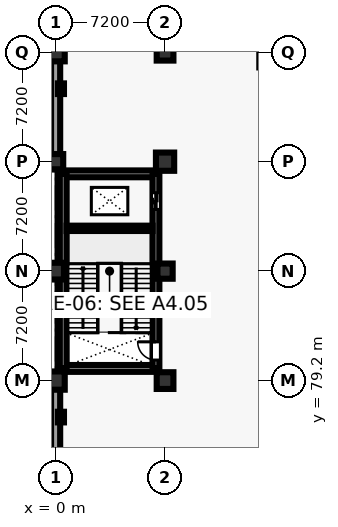
"""IFC4 building model, lengths in metres.
Left out: names, types, materials, properties, quantities, classifications, styles, units other than length and angle.
Written with IfcOpenShell. Run it as: python <this file> out.ifc"""

import sys

from ifc_helpers import new_model, si_unit, direction, frame, frame_2d, origin, origin_2d, place, context, subcontext, project, spatial, rectangle, circle, extrude, element, fill, save


model = new_model("IFC4")
c1 = context("Model", 3, precision=1e-05, world=origin(), true_north=direction((0.0, 1.0)))
c2 = subcontext(c1, "Body", "Model", "MODEL_VIEW")
j1 = project(units=[si_unit("LENGTHUNIT", "METRE"), si_unit("PLANEANGLEUNIT", "RADIAN")], contexts=[c1])
p1 = place(None, origin())
s1 = spatial("IfcSite", under=j1, at=p1, CompositionType="ELEMENT")
p2 = place(p1, origin())
s2 = spatial("IfcBuilding", under=s1, at=p2, CompositionType="ELEMENT")
p3 = place(p2, frame((0.0, 0.0, -5.4)))
s3 = spatial("IfcBuildingStorey", under=s2, at=p3, CompositionType="ELEMENT", Elevation=-5.4)
p4 = place(p3, frame((0.0, 79.2, 0.0), z_axis=(0.0, 0.0, 1.0), x_axis=(1.0, 0.0, 0.0)))
e1 = element("IfcColumn", 1, at=p4, inside=s3, PredefinedType="COLUMN", context=c2, shape_type="SweptSolid", body=[
    extrude(circle(Radius=0.6, at=origin_2d()), origin(), (0.0, 0.0, 1.0), 5.4),
])
p5 = place(p3, frame((0.0, 86.4, 0.0), z_axis=(0.0, 0.0, 1.0), x_axis=(1.0, 0.0, 0.0)))
e2 = element("IfcColumn", 2, at=p5, inside=s3, PredefinedType="COLUMN", context=c2, shape_type="SweptSolid", body=[
    extrude(rectangle(XDim=1.1, YDim=1.1, at=origin_2d()), origin(), (0.0, 0.0, 1.0), 5.4),
])
p6 = place(p3, frame((0.0, 93.6, 0.0), z_axis=(0.0, 0.0, 1.0), x_axis=(1.0, 0.0, 0.0)))
e3 = element("IfcColumn", 3, at=p6, inside=s3, PredefinedType="COLUMN", context=c2, shape_type="SweptSolid", body=[
    extrude(rectangle(XDim=1.0, YDim=1.0, at=origin_2d()), origin(), (0.0, 0.0, 1.0), 5.4),
])
p7 = place(p3, frame((0.0, 100.8, 0.0), z_axis=(0.0, 0.0, 1.0), x_axis=(1.0, 0.0, 0.0)))
e4 = element("IfcColumn", 4, at=p7, inside=s3, PredefinedType="COLUMN", context=c2, shape_type="SweptSolid", body=[
    extrude(circle(Radius=0.6, at=origin_2d()), origin(), (0.0, 0.0, 1.0), 5.4),
])
p8 = place(p3, frame((7.2, 79.2, 0.0), z_axis=(0.0, 0.0, 1.0), x_axis=(1.0, 0.0, 0.0)))
e5 = element("IfcColumn", 5, at=p8, inside=s3, PredefinedType="COLUMN", context=c2, shape_type="SweptSolid", body=[
    extrude(rectangle(XDim=1.1, YDim=1.1, at=origin_2d()), origin(), (0.0, 0.0, 1.0), 5.4),
])
p9 = place(p3, frame((7.2, 86.4, 0.0), z_axis=(0.0, 0.0, 1.0), x_axis=(1.0, 0.0, 0.0)))
e6 = element("IfcColumn", 6, at=p9, inside=s3, PredefinedType="COLUMN", context=c2, shape_type="SweptSolid", body=[
    extrude(rectangle(XDim=1.0, YDim=1.0, at=origin_2d()), origin(), (0.0, 0.0, 1.0), 5.4),
])
p10 = place(p3, frame((7.2, 93.6, 0.0), z_axis=(0.0, 0.0, 1.0), x_axis=(1.0, 0.0, 0.0)))
e7 = element("IfcColumn", 7, at=p10, inside=s3, PredefinedType="COLUMN", context=c2, shape_type="SweptSolid", body=[
    extrude(circle(Radius=0.6, at=origin_2d()), origin(), (0.0, 0.0, 1.0), 5.4),
])
p11 = place(p3, frame((7.2, 100.8, 0.0), z_axis=(0.0, 0.0, 1.0), x_axis=(1.0, 0.0, 0.0)))
e8 = element("IfcColumn", 8, at=p11, inside=s3, PredefinedType="COLUMN", context=c2, shape_type="SweptSolid", body=[
    extrude(rectangle(XDim=1.1, YDim=1.1, at=origin_2d()), origin(), (0.0, 0.0, 1.0), 5.4),
])
for number, where, z_axis, x_axis in (
    (9, (0.35, 76.8, 0.0), (0.0, 0.0, 1.0), (1.0, 0.0, 0.0)),
    (10, (0.35, 98.4, 0.0), (0.0, 0.0, 1.0), (1.0, 0.0, 0.0)),
):
    element("IfcColumn", number, at=place(p3, frame(where, z_axis=z_axis, x_axis=x_axis)), inside=s3, PredefinedType="PILASTER", context=c2, shape_type="SweptSolid", body=[
        extrude(rectangle(XDim=0.4, YDim=0.7, at=origin_2d()), origin(), (0.0, 0.0, 1.0), 5.0),
    ])
p12 = place(p3, frame((0.0, 49.9, 0.0), z_axis=(0.0, 0.0, 1.0), x_axis=(0.0, 1.0, 0.0)))
e11 = element("IfcWall", 11, at=p12, inside=s3, PredefinedType="USERDEFINED", context=c2, shape_type="SweptSolid", body=[
    extrude(rectangle(XDim=29.8, YDim=0.6, at=frame_2d((14.9, 0.0))), origin(), (0.0, 0.0, 1.0), 4.98),
])
p13 = place(p3, frame((0.0, 93.1, 0.0), z_axis=(0.0, 0.0, 1.0), x_axis=(0.0, 1.0, 0.0)))
e12 = element("IfcWall", 12, at=p13, inside=s3, PredefinedType="USERDEFINED", context=c2, shape_type="SweptSolid", body=[
    extrude(rectangle(XDim=36.5, YDim=0.6, at=frame_2d((18.25, 0.0))), origin(), (0.0, 0.0, 1.0), 4.98),
])
for number, where, z_axis, x_axis in (
    (13, (0.5, 80.0, 0.0), (0.0, 0.0, 1.0), (1.0, 0.0, 0.0)),
    (14, (0.5, 92.8, 0.0), (0.0, 0.0, 1.0), (1.0, 0.0, 0.0)),
):
    element("IfcWall", number, at=place(p3, frame(where, z_axis=z_axis, x_axis=x_axis)), inside=s3, PredefinedType="SHEAR", context=c2, shape_type="SweptSolid", body=[
        extrude(rectangle(XDim=6.1, YDim=0.45, at=frame_2d((3.05, 0.0))), origin(), (0.0, 0.0, 1.0), 5.02),
    ])
p14 = place(p3, frame((0.5, 80.0, 0.0), z_axis=(0.0, 0.0, 1.0), x_axis=(0.0, 1.0, 0.0)))
e15 = element("IfcWall", 15, at=p14, inside=s3, PredefinedType="SHEAR", context=c2, shape_type="SweptSolid", body=[
    extrude(rectangle(XDim=12.8, YDim=0.45, at=frame_2d((6.4, 0.0))), origin(), (0.0, 0.0, 1.0), 5.02),
])
p15 = place(p3, frame((6.6, 80.0, 0.0), z_axis=(0.0, 0.0, 1.0), x_axis=(0.0, 1.0, 0.0)))
e16 = element("IfcWall", 16, at=p15, inside=s3, PredefinedType="SHEAR", context=c2, shape_type="SweptSolid", body=[
    extrude(rectangle(XDim=12.8, YDim=0.45, at=frame_2d((6.4, 0.0))), origin(), (0.0, 0.0, 1.0), 5.02),
])
p16 = place(p15, frame((0.55, 0.0, 0.0)))
e17 = element("IfcOpeningElement", 17, at=p16, cuts=e16, PredefinedType="OPENING", context=c2, shape_type="SweptSolid", body=[
    extrude(rectangle(XDim=1.2, YDim=2.25, at=frame_2d((0.6, 1.125))), frame((0.0, 0.235, 0.0), z_axis=(0.0, -1.0, 0.0), x_axis=(1.0, 0.0, 0.0)), (0.0, 0.0, 1.0), 0.47),
])
p17 = place(p15, frame((10.458, 0.0, 0.0)))
e18 = element("IfcOpeningElement", 18, at=p17, cuts=e16, PredefinedType="OPENING", context=c2, shape_type="SweptSolid", body=[
    extrude(rectangle(XDim=1.1, YDim=2.2, at=frame_2d((0.55, 1.1))), frame((0.0, 0.235, 0.0), z_axis=(0.0, -1.0, 0.0), x_axis=(1.0, 0.0, 0.0)), (0.0, 0.0, 1.0), 0.47),
])
p18 = place(p3, frame((0.725, 89.216, 0.0), z_axis=(0.0, 0.0, 1.0), x_axis=(1.0, 0.0, 0.0)))
e19 = element("IfcWall", 19, at=p18, inside=s3, PredefinedType="SHEAR", context=c2, shape_type="SweptSolid", body=[
    extrude(rectangle(XDim=5.65, YDim=0.35, at=frame_2d((2.825, 0.0))), origin(), (0.0, 0.0, 1.0), 5.02),
])
p19 = place(p16, origin())
e20 = element("IfcDoor", 20, at=p19, inside=s3, OperationType="SINGLE_SWING_RIGHT", PredefinedType="DOOR", context=c2, shape_type="SweptSolid", body=[
    extrude(rectangle(XDim=1.2, YDim=2.25, at=frame_2d((0.6, 1.125))), frame((0.0, 0.025, 0.0), z_axis=(0.0, -1.0, 0.0), x_axis=(1.0, 0.0, 0.0)), (0.0, 0.0, 1.0), 0.05),
])
fill(e17, e20)
p20 = place(p17, origin())
e21 = element("IfcDoor", 21, at=p20, inside=s3, OperationType="SLIDING_TO_LEFT", PredefinedType="DOOR", context=c2, shape_type="SweptSolid", body=[
    extrude(rectangle(XDim=1.1, YDim=2.2, at=frame_2d((0.55, 1.1))), frame((0.0, 0.025, 0.0), z_axis=(0.0, -1.0, 0.0), x_axis=(1.0, 0.0, 0.0)), (0.0, 0.0, 1.0), 0.05),
])
fill(e18, e21)
save(model, sys.argv[1])
